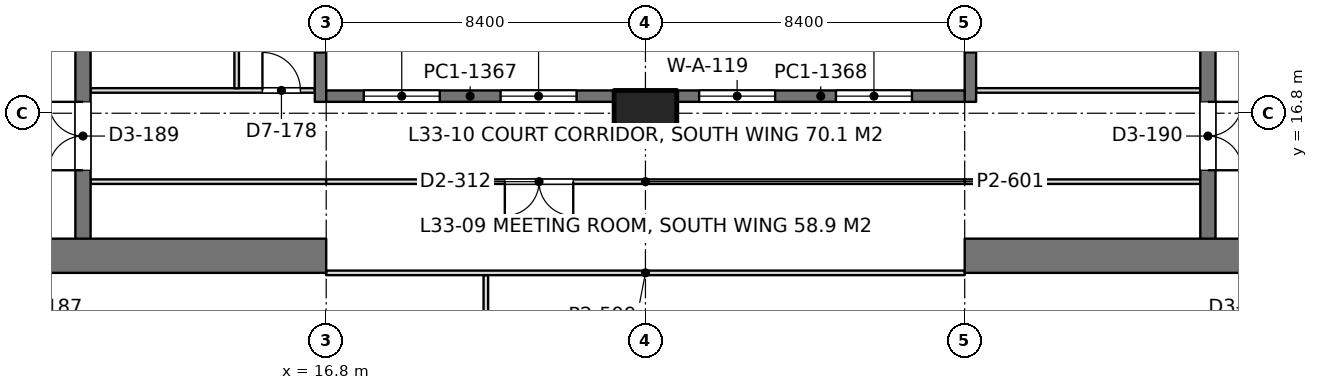
"""IFC4 building model, lengths in metres.
Left out: names, types, materials, properties, quantities, classifications, styles, units other than length and angle.
Written with IfcOpenShell. Run it as: python <this file> out.ifc"""

import sys

from ifc_helpers import new_model, si_unit, direction, frame, frame_2d, origin, origin_2d, place, context, subcontext, project, spatial, rectangle, extrude, element, fill, save


model = new_model("IFC4")
c1 = context("Model", 3, precision=1e-05, world=origin(), true_north=direction((0.0, 1.0)))
c2 = subcontext(c1, "Body", "Model", "MODEL_VIEW")
j1 = project(units=[si_unit("LENGTHUNIT", "METRE"), si_unit("PLANEANGLEUNIT", "RADIAN")], contexts=[c1])
p1 = place(None, origin())
s1 = spatial("IfcSite", under=j1, at=p1, CompositionType="ELEMENT")
p2 = place(p1, origin())
s2 = spatial("IfcBuilding", under=s1, at=p2, CompositionType="ELEMENT")
p3 = place(p2, frame((0.0, 0.0, 147.0)))
s3 = spatial("IfcBuildingStorey", under=s2, at=p3, CompositionType="ELEMENT", Elevation=147.0)
p4 = place(p3, frame((25.2, 16.8, 0.0), z_axis=(0.0, 0.0, 1.0), x_axis=(1.0, 0.0, 0.0)))
e1 = element("IfcColumn", 1, at=p4, inside=s3, PredefinedType="COLUMN", context=c2, shape_type="SweptSolid", body=[
    extrude(rectangle(XDim=1.65, YDim=1.2, at=origin_2d()), origin(), (0.0, 0.0, 1.0), 4.2),
])
p5 = place(p3, frame((-1.2, 13.05, 0.0), z_axis=(0.0, 0.0, 1.0), x_axis=(1.0, 0.0, 0.0)))
e2 = element("IfcWall", 2, at=p5, inside=s3, PredefinedType="SHEAR", context=c2, shape_type="SweptSolid", body=[
    extrude(rectangle(XDim=18.0, YDim=0.9, at=frame_2d((9.0, 0.0))), origin(), (0.0, 0.0, 1.0), 4.2),
])
p6 = place(p5, frame((8.95, 0.0, 0.0)))
e3 = element("IfcOpeningElement", 3, at=p6, cuts=e2, PredefinedType="OPENING", context=c2, shape_type="SweptSolid", body=[
    extrude(rectangle(XDim=1.8, YDim=2.4, at=frame_2d((0.9, 1.2))), frame((0.0, 0.46, 0.0), z_axis=(0.0, -1.0, 0.0), x_axis=(1.0, 0.0, 0.0)), (0.0, 0.0, 1.0), 0.92),
])
p7 = place(p3, frame((10.4, 13.05, 0.0), z_axis=(0.0, 0.0, 1.0), x_axis=(0.0, 1.0, 0.0)))
e4 = element("IfcWall", 4, at=p7, inside=s3, PredefinedType="SHEAR", context=c2, shape_type="SweptSolid", body=[
    extrude(rectangle(XDim=24.3, YDim=0.4, at=frame_2d((12.15, 0.0))), origin(), (0.0, 0.0, 1.0), 4.2),
])
p8 = place(p7, frame((10.05, 0.0, 0.0)))
e5 = element("IfcOpeningElement", 5, at=p8, cuts=e4, PredefinedType="OPENING", context=c2, shape_type="SweptSolid", body=[
    extrude(rectangle(XDim=1.1, YDim=2.2, at=frame_2d((0.55, 1.1))), frame((0.0, 0.21, 0.0), z_axis=(0.0, -1.0, 0.0), x_axis=(1.0, 0.0, 0.0)), (0.0, 0.0, 1.0), 0.42),
])
p9 = place(p7, frame((12.9, 0.0, 0.0)))
e6 = element("IfcOpeningElement", 6, at=p9, cuts=e4, PredefinedType="OPENING", context=c2, shape_type="SweptSolid", body=[
    extrude(rectangle(XDim=1.1, YDim=2.2, at=frame_2d((0.55, 1.1))), frame((0.0, 0.21, 0.0), z_axis=(0.0, -1.0, 0.0), x_axis=(1.0, 0.0, 0.0)), (0.0, 0.0, 1.0), 0.42),
])
p10 = place(p7, frame((21.45, 0.0, 0.0)))
e7 = element("IfcOpeningElement", 7, at=p10, cuts=e4, PredefinedType="OPENING", context=c2, shape_type="SweptSolid", body=[
    extrude(rectangle(XDim=1.1, YDim=2.2, at=frame_2d((0.55, 1.1))), frame((0.0, 0.21, 0.0), z_axis=(0.0, -1.0, 0.0), x_axis=(1.0, 0.0, 0.0)), (0.0, 0.0, 1.0), 0.42),
])
p11 = place(p7, frame((2.25, 0.0, 0.0)))
e8 = element("IfcOpeningElement", 8, at=p11, cuts=e4, PredefinedType="OPENING", context=c2, shape_type="SweptSolid", body=[
    extrude(rectangle(XDim=1.8, YDim=2.4, at=frame_2d((0.9, 1.2))), frame((0.0, 0.21, 0.0), z_axis=(0.0, -1.0, 0.0), x_axis=(1.0, 0.0, 0.0)), (0.0, 0.0, 1.0), 0.42),
])
p12 = place(p7, frame((5.8, 0.0, 0.0)))
e9 = element("IfcOpeningElement", 9, at=p12, cuts=e4, PredefinedType="OPENING", context=c2, shape_type="SweptSolid", body=[
    extrude(rectangle(XDim=1.8, YDim=2.4, at=frame_2d((0.9, 1.2))), frame((0.0, 0.21, 0.0), z_axis=(0.0, -1.0, 0.0), x_axis=(1.0, 0.0, 0.0)), (0.0, 0.0, 1.0), 0.42),
])
p13 = place(p3, frame((33.6, 13.05, 0.0), z_axis=(0.0, 0.0, 1.0), x_axis=(1.0, 0.0, 0.0)))
e10 = element("IfcWall", 10, at=p13, inside=s3, PredefinedType="SHEAR", context=c2, shape_type="SweptSolid", body=[
    extrude(rectangle(XDim=18.0, YDim=0.9, at=frame_2d((9.0, 0.0))), origin(), (0.0, 0.0, 1.0), 4.2),
])
p14 = place(p13, frame((7.25, 0.0, 0.0)))
e11 = element("IfcOpeningElement", 11, at=p14, cuts=e10, PredefinedType="OPENING", context=c2, shape_type="SweptSolid", body=[
    extrude(rectangle(XDim=1.8, YDim=2.4, at=frame_2d((0.9, 1.2))), frame((0.0, 0.46, 0.0), z_axis=(0.0, -1.0, 0.0), x_axis=(1.0, 0.0, 0.0)), (0.0, 0.0, 1.0), 0.92),
])
p15 = place(p3, frame((40.0, 13.05, 0.0), z_axis=(0.0, 0.0, 1.0), x_axis=(0.0, 1.0, 0.0)))
e12 = element("IfcWall", 12, at=p15, inside=s3, PredefinedType="SHEAR", context=c2, shape_type="SweptSolid", body=[
    extrude(rectangle(XDim=24.3, YDim=0.4, at=frame_2d((12.15, 0.0))), origin(), (0.0, 0.0, 1.0), 4.2),
])
p16 = place(p15, frame((10.05, 0.0, 0.0)))
e13 = element("IfcOpeningElement", 13, at=p16, cuts=e12, PredefinedType="OPENING", context=c2, shape_type="SweptSolid", body=[
    extrude(rectangle(XDim=1.1, YDim=2.2, at=frame_2d((0.55, 1.1))), frame((0.0, 0.21, 0.0), z_axis=(0.0, -1.0, 0.0), x_axis=(1.0, 0.0, 0.0)), (0.0, 0.0, 1.0), 0.42),
])
p17 = place(p15, frame((12.9, 0.0, 0.0)))
e14 = element("IfcOpeningElement", 14, at=p17, cuts=e12, PredefinedType="OPENING", context=c2, shape_type="SweptSolid", body=[
    extrude(rectangle(XDim=1.1, YDim=2.2, at=frame_2d((0.55, 1.1))), frame((0.0, 0.21, 0.0), z_axis=(0.0, -1.0, 0.0), x_axis=(1.0, 0.0, 0.0)), (0.0, 0.0, 1.0), 0.42),
])
p18 = place(p15, frame((21.45, 0.0, 0.0)))
e15 = element("IfcOpeningElement", 15, at=p18, cuts=e12, PredefinedType="OPENING", context=c2, shape_type="SweptSolid", body=[
    extrude(rectangle(XDim=1.1, YDim=2.2, at=frame_2d((0.55, 1.1))), frame((0.0, 0.21, 0.0), z_axis=(0.0, -1.0, 0.0), x_axis=(1.0, 0.0, 0.0)), (0.0, 0.0, 1.0), 0.42),
])
p19 = place(p15, frame((2.25, 0.0, 0.0)))
e16 = element("IfcOpeningElement", 16, at=p19, cuts=e12, PredefinedType="OPENING", context=c2, shape_type="SweptSolid", body=[
    extrude(rectangle(XDim=1.8, YDim=2.4, at=frame_2d((0.9, 1.2))), frame((0.0, 0.21, 0.0), z_axis=(0.0, -1.0, 0.0), x_axis=(1.0, 0.0, 0.0)), (0.0, 0.0, 1.0), 0.42),
])
p20 = place(p15, frame((5.8, 0.0, 0.0)))
e17 = element("IfcOpeningElement", 17, at=p20, cuts=e12, PredefinedType="OPENING", context=c2, shape_type="SweptSolid", body=[
    extrude(rectangle(XDim=1.8, YDim=2.4, at=frame_2d((0.9, 1.2))), frame((0.0, 0.21, 0.0), z_axis=(0.0, -1.0, 0.0), x_axis=(1.0, 0.0, 0.0)), (0.0, 0.0, 1.0), 0.42),
])
p21 = place(p3, frame((16.65, 17.1, 0.0), z_axis=(0.0, 0.0, 1.0), x_axis=(0.0, 1.0, 0.0)))
e18 = element("IfcWall", 18, at=p21, inside=s3, PredefinedType="SOLIDWALL", context=c2, shape_type="SweptSolid", body=[
    extrude(rectangle(XDim=5.0, YDim=0.3, at=frame_2d((2.5, 0.0))), origin(), (0.0, 0.0, 1.0), 4.05),
])
p22 = place(p21, frame((1.3, 0.0, 0.1)))
e19 = element("IfcOpeningElement", 19, at=p22, cuts=e18, PredefinedType="OPENING", context=c2, shape_type="SweptSolid", body=[
    extrude(rectangle(XDim=2.0, YDim=3.0, at=frame_2d((1.0, 1.5))), frame((0.0, 0.16, 0.0), z_axis=(0.0, -1.0, 0.0), x_axis=(1.0, 0.0, 0.0)), (0.0, 0.0, 1.0), 0.32),
])
p23 = place(p3, frame((33.75, 17.1, 0.0), z_axis=(0.0, 0.0, 1.0), x_axis=(0.0, 1.0, 0.0)))
e20 = element("IfcWall", 20, at=p23, inside=s3, PredefinedType="SOLIDWALL", context=c2, shape_type="SweptSolid", body=[
    extrude(rectangle(XDim=5.0, YDim=0.3, at=frame_2d((2.5, 0.0))), origin(), (0.0, 0.0, 1.0), 4.05),
])
p24 = place(p23, frame((1.3, 0.0, 0.1)))
e21 = element("IfcOpeningElement", 21, at=p24, cuts=e20, PredefinedType="OPENING", context=c2, shape_type="SweptSolid", body=[
    extrude(rectangle(XDim=2.0, YDim=3.0, at=frame_2d((1.0, 1.5))), frame((0.0, 0.16, 0.0), z_axis=(0.0, -1.0, 0.0), x_axis=(1.0, 0.0, 0.0)), (0.0, 0.0, 1.0), 0.32),
])
p25 = place(p3, frame((16.8, 17.25, 0.0), z_axis=(0.0, 0.0, 1.0), x_axis=(1.0, 0.0, 0.0)))
e22 = element("IfcWall", 22, at=p25, inside=s3, PredefinedType="SOLIDWALL", context=c2, shape_type="SweptSolid", body=[
    extrude(rectangle(XDim=7.575, YDim=0.3, at=frame_2d((3.788, 0.0))), origin(), (0.0, 0.0, 1.0), 4.05),
])
p26 = place(p25, frame((0.988, 0.0, 0.1)))
e23 = element("IfcOpeningElement", 23, at=p26, cuts=e22, PredefinedType="OPENING", context=c2, shape_type="SweptSolid", body=[
    extrude(rectangle(XDim=2.0, YDim=3.0, at=frame_2d((1.0, 1.5))), frame((0.0, 0.16, 0.0), z_axis=(0.0, -1.0, 0.0), x_axis=(1.0, 0.0, 0.0)), (0.0, 0.0, 1.0), 0.32),
])
p27 = place(p25, frame((4.587, 0.0, 0.1)))
e24 = element("IfcOpeningElement", 24, at=p27, cuts=e22, PredefinedType="OPENING", context=c2, shape_type="SweptSolid", body=[
    extrude(rectangle(XDim=2.0, YDim=3.0, at=frame_2d((1.0, 1.5))), frame((0.0, 0.16, 0.0), z_axis=(0.0, -1.0, 0.0), x_axis=(1.0, 0.0, 0.0)), (0.0, 0.0, 1.0), 0.32),
])
p28 = place(p3, frame((26.025, 17.25, 0.0), z_axis=(0.0, 0.0, 1.0), x_axis=(1.0, 0.0, 0.0)))
e25 = element("IfcWall", 25, at=p28, inside=s3, PredefinedType="SOLIDWALL", context=c2, shape_type="SweptSolid", body=[
    extrude(rectangle(XDim=7.575, YDim=0.3, at=frame_2d((3.788, 0.0))), origin(), (0.0, 0.0, 1.0), 4.05),
])
p29 = place(p28, frame((0.587, 0.0, 0.1)))
e26 = element("IfcOpeningElement", 26, at=p29, cuts=e25, PredefinedType="OPENING", context=c2, shape_type="SweptSolid", body=[
    extrude(rectangle(XDim=2.0, YDim=3.0, at=frame_2d((1.0, 1.5))), frame((0.0, 0.16, 0.0), z_axis=(0.0, -1.0, 0.0), x_axis=(1.0, 0.0, 0.0)), (0.0, 0.0, 1.0), 0.32),
])
p30 = place(p28, frame((4.188, 0.0, 0.1)))
e27 = element("IfcOpeningElement", 27, at=p30, cuts=e25, PredefinedType="OPENING", context=c2, shape_type="SweptSolid", body=[
    extrude(rectangle(XDim=2.0, YDim=3.0, at=frame_2d((1.0, 1.5))), frame((0.0, 0.16, 0.0), z_axis=(0.0, -1.0, 0.0), x_axis=(1.0, 0.0, 0.0)), (0.0, 0.0, 1.0), 0.32),
])
p31 = place(p3, frame((10.598, 17.4, 0.0), z_axis=(0.0, 0.0, 1.0), x_axis=(1.0, 0.0, 0.0)))
e28 = element("IfcWall", 28, at=p31, inside=s3, PredefinedType="PARTITIONING", context=c2, shape_type="SweptSolid", body=[
    extrude(rectangle(XDim=5.904, YDim=0.12, at=frame_2d((2.952, 0.0))), origin(), (0.0, 0.0, 1.0), 3.55),
])
p32 = place(p31, frame((4.524, 0.0, 0.0)))
e29 = element("IfcOpeningElement", 29, at=p32, cuts=e28, PredefinedType="OPENING", context=c2, shape_type="SweptSolid", body=[
    extrude(rectangle(XDim=1.0, YDim=2.4, at=frame_2d((0.5, 1.2))), frame((0.0, 0.07, 0.0), z_axis=(0.0, -1.0, 0.0), x_axis=(1.0, 0.0, 0.0)), (0.0, 0.0, 1.0), 0.14),
])
p33 = place(p3, frame((14.444, 17.458, 0.0), z_axis=(0.0, 0.0, 1.0), x_axis=(0.0, 1.0, 0.0)))
e30 = element("IfcWall", 30, at=p33, inside=s3, PredefinedType="PARTITIONING", context=c2, shape_type="SweptSolid", body=[
    extrude(rectangle(XDim=4.644, YDim=0.12, at=frame_2d((2.322, 0.0))), origin(), (0.0, 0.0, 1.0), 3.6),
])
p34 = place(p3, frame((33.898, 17.4, 0.0), z_axis=(0.0, 0.0, 1.0), x_axis=(1.0, 0.0, 0.0)))
e31 = element("IfcWall", 31, at=p34, inside=s3, PredefinedType="PARTITIONING", context=c2, shape_type="SweptSolid", body=[
    extrude(rectangle(XDim=5.904, YDim=0.12, at=frame_2d((2.952, 0.0))), origin(), (0.0, 0.0, 1.0), 3.55),
])
p35 = place(p3, frame((21.0, 1.898, 0.0), z_axis=(0.0, 0.0, 1.0), x_axis=(0.0, 1.0, 0.0)))
e32 = element("IfcWall", 32, at=p35, inside=s3, PredefinedType="PARTITIONING", context=c2, shape_type="SweptSolid", body=[
    extrude(rectangle(XDim=10.644, YDim=0.12, at=frame_2d((5.322, 0.0))), origin(), (0.0, 0.0, 1.0), 3.55),
])
for number, where, z_axis, x_axis in (
    (33, (10.598, 15.0, 0.0), (0.0, 0.0, 1.0), (1.0, 0.0, 0.0)),
    (34, (33.598, 15.0, 0.0), (0.0, 0.0, 1.0), (1.0, 0.0, 0.0)),
):
    element("IfcWall", number, at=place(p3, frame(where, z_axis=z_axis, x_axis=x_axis)), inside=s3, PredefinedType="PARTITIONING", context=c2, shape_type="SweptSolid", body=[
        extrude(rectangle(XDim=6.204, YDim=0.12, at=frame_2d((3.102, 0.0))), origin(), (0.0, 0.0, 1.0), 3.55),
    ])
p36 = place(p3, frame((16.798, 15.0, 0.0), z_axis=(0.0, 0.0, 1.0), x_axis=(1.0, 0.0, 0.0)))
e35 = element("IfcWall", 35, at=p36, inside=s3, PredefinedType="PARTITIONING", context=c2, shape_type="SweptSolid", body=[
    extrude(rectangle(XDim=16.804, YDim=0.12, at=frame_2d((8.402, 0.0))), origin(), (0.0, 0.0, 1.0), 3.55),
])
p37 = place(p36, frame((4.702, 0.0, 0.0)))
e36 = element("IfcOpeningElement", 36, at=p37, cuts=e35, PredefinedType="OPENING", context=c2, shape_type="SweptSolid", body=[
    extrude(rectangle(XDim=1.8, YDim=2.2, at=frame_2d((0.9, 1.1))), frame((0.0, 0.07, 0.0), z_axis=(0.0, -1.0, 0.0), x_axis=(1.0, 0.0, 0.0)), (0.0, 0.0, 1.0), 0.14),
])
p38 = place(p3, frame((16.8, 12.6, 0.0), z_axis=(0.0, 0.0, 1.0), x_axis=(1.0, 0.0, 0.0)))
e37 = element("IfcWall", 37, at=p38, inside=s3, PredefinedType="PARTITIONING", context=c2, shape_type="SweptSolid", body=[
    extrude(rectangle(XDim=16.8, YDim=0.12, at=frame_2d((8.4, 0.0))), origin(), (0.0, 0.0, 1.0), 3.55),
])
p39 = place(p26, origin())
e38 = element("IfcWindow", 38, at=p39, inside=s3, PartitioningType="SINGLE_PANEL", PredefinedType="WINDOW", context=c2, shape_type="SweptSolid", body=[
    extrude(rectangle(XDim=2.0, YDim=3.0, at=frame_2d((1.0, 1.5))), frame((0.0, 0.03, 0.0), z_axis=(0.0, -1.0, 0.0), x_axis=(1.0, 0.0, 0.0)), (0.0, 0.0, 1.0), 0.06),
])
fill(e23, e38)
p40 = place(p27, origin())
e39 = element("IfcWindow", 39, at=p40, inside=s3, PartitioningType="SINGLE_PANEL", PredefinedType="WINDOW", context=c2, shape_type="SweptSolid", body=[
    extrude(rectangle(XDim=2.0, YDim=3.0, at=frame_2d((1.0, 1.5))), frame((0.0, 0.03, 0.0), z_axis=(0.0, -1.0, 0.0), x_axis=(1.0, 0.0, 0.0)), (0.0, 0.0, 1.0), 0.06),
])
fill(e24, e39)
p41 = place(p29, origin())
e40 = element("IfcWindow", 40, at=p41, inside=s3, PartitioningType="SINGLE_PANEL", PredefinedType="WINDOW", context=c2, shape_type="SweptSolid", body=[
    extrude(rectangle(XDim=2.0, YDim=3.0, at=frame_2d((1.0, 1.5))), frame((0.0, 0.03, 0.0), z_axis=(0.0, -1.0, 0.0), x_axis=(1.0, 0.0, 0.0)), (0.0, 0.0, 1.0), 0.06),
])
fill(e26, e40)
p42 = place(p30, origin())
e41 = element("IfcWindow", 41, at=p42, inside=s3, PartitioningType="SINGLE_PANEL", PredefinedType="WINDOW", context=c2, shape_type="SweptSolid", body=[
    extrude(rectangle(XDim=2.0, YDim=3.0, at=frame_2d((1.0, 1.5))), frame((0.0, 0.03, 0.0), z_axis=(0.0, -1.0, 0.0), x_axis=(1.0, 0.0, 0.0)), (0.0, 0.0, 1.0), 0.06),
])
fill(e27, e41)
p43 = place(p11, origin())
e42 = element("IfcDoor", 42, at=p43, inside=s3, OperationType="DOUBLE_DOOR_SINGLE_SWING", PredefinedType="DOOR", context=c2, shape_type="SweptSolid", body=[
    extrude(rectangle(XDim=1.8, YDim=2.4, at=frame_2d((0.9, 1.2))), frame((0.0, 0.025, 0.0), z_axis=(0.0, -1.0, 0.0), x_axis=(1.0, 0.0, 0.0)), (0.0, 0.0, 1.0), 0.05),
])
fill(e8, e42)
p44 = place(p19, frame((1.8, 0.0, 0.0), z_axis=(0.0, 0.0, 1.0), x_axis=(-1.0, 0.0, 0.0)))
e43 = element("IfcDoor", 43, at=p44, inside=s3, OperationType="DOUBLE_DOOR_SINGLE_SWING", PredefinedType="DOOR", context=c2, shape_type="SweptSolid", body=[
    extrude(rectangle(XDim=1.8, YDim=2.4, at=frame_2d((0.9, 1.2))), frame((0.0, 0.025, 0.0), z_axis=(0.0, -1.0, 0.0), x_axis=(1.0, 0.0, 0.0)), (0.0, 0.0, 1.0), 0.05),
])
fill(e16, e43)
p45 = place(p32, origin())
e44 = element("IfcDoor", 44, at=p45, inside=s3, OperationType="SINGLE_SWING_LEFT", PredefinedType="DOOR", context=c2, shape_type="SweptSolid", body=[
    extrude(rectangle(XDim=1.0, YDim=2.4, at=frame_2d((0.5, 1.2))), frame((0.0, 0.025, 0.0), z_axis=(0.0, -1.0, 0.0), x_axis=(1.0, 0.0, 0.0)), (0.0, 0.0, 1.0), 0.05),
])
fill(e29, e44)
p46 = place(p37, frame((1.8, 0.0, 0.0), z_axis=(0.0, 0.0, 1.0), x_axis=(-1.0, 0.0, 0.0)))
e45 = element("IfcDoor", 45, at=p46, inside=s3, OperationType="DOUBLE_DOOR_SINGLE_SWING", PredefinedType="DOOR", context=c2, shape_type="SweptSolid", body=[
    extrude(rectangle(XDim=1.8, YDim=2.2, at=frame_2d((0.9, 1.1))), frame((0.0, 0.025, 0.0), z_axis=(0.0, -1.0, 0.0), x_axis=(1.0, 0.0, 0.0)), (0.0, 0.0, 1.0), 0.05),
])
fill(e36, e45)
save(model, sys.argv[1])
